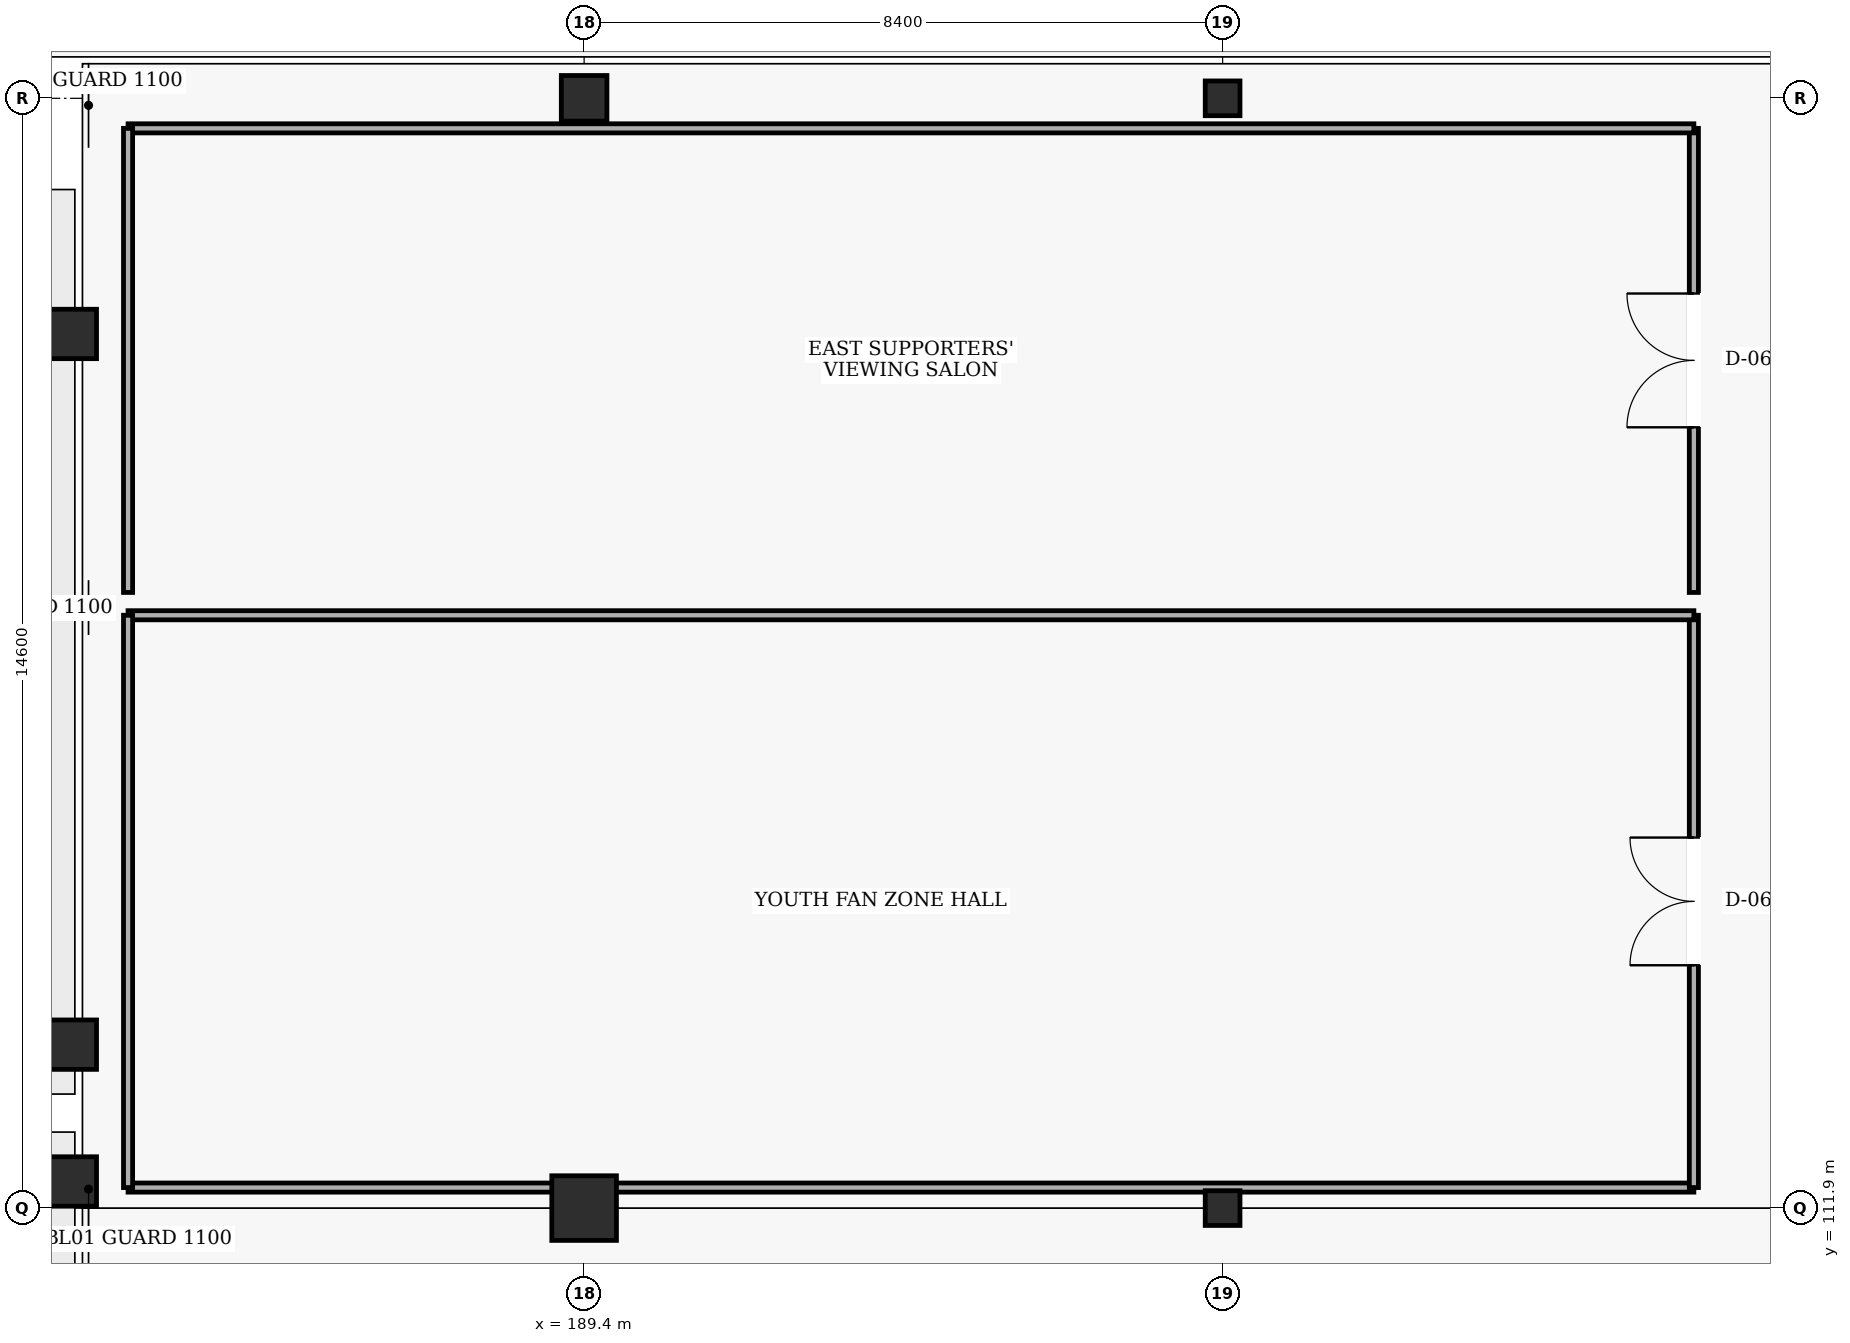
"""IFC4 building model, lengths in metres.
Left out: names, types, materials, properties, quantities, classifications, styles, units other than length and angle.
Written with IfcOpenShell. Run it as: python <this file> out.ifc"""

import sys

from ifc_helpers import new_model, si_unit, direction, frame, frame_2d, origin, origin_2d, place, context, subcontext, project, spatial, rectangle, hollow_circle, extrude, element, fill, save


model = new_model("IFC4")
c1 = context("Model", 3, precision=1e-05, world=origin(), true_north=direction((0.0, 1.0)))
c2 = subcontext(c1, "Body", "Model", "MODEL_VIEW")
j1 = project(units=[si_unit("LENGTHUNIT", "METRE"), si_unit("PLANEANGLEUNIT", "RADIAN")], contexts=[c1])
p1 = place(None, origin())
s1 = spatial("IfcSite", under=j1, at=p1, CompositionType="ELEMENT")
p2 = place(p1, origin())
s2 = spatial("IfcBuilding", under=s1, at=p2, CompositionType="ELEMENT")
p3 = place(p2, frame((0.0, 0.0, 15.0)))
s3 = spatial("IfcBuildingStorey", under=s2, at=p3, CompositionType="ELEMENT", Elevation=15.0)
p4 = place(p3, frame((189.4, 111.9, 0.0), z_axis=(0.0, 0.0, 1.0), x_axis=(1.0, 0.0, 0.0)))
e1 = element("IfcColumn", 1, at=p4, inside=s3, PredefinedType="COLUMN", context=c2, shape_type="SweptSolid", body=[
    extrude(rectangle(XDim=0.85, YDim=0.85, at=origin_2d()), origin(), (0.0, 0.0, 1.0), 4.8),
])
p5 = place(p3, frame((189.4, 126.5, 0.0), z_axis=(0.0, 0.0, 1.0), x_axis=(1.0, 0.0, 0.0)))
e2 = element("IfcColumn", 2, at=p5, inside=s3, PredefinedType="COLUMN", context=c2, shape_type="SweptSolid", body=[
    extrude(rectangle(XDim=0.6, YDim=0.6, at=origin_2d()), origin(), (0.0, 0.0, 1.0), 4.8),
])
for number, where, z_axis, x_axis in (
    (3, (197.8, 111.9, 0.0), (0.0, 0.0, 1.0), (1.0, 0.0, 0.0)),
    (4, (197.8, 126.5, 0.0), (0.0, 0.0, 1.0), (1.0, 0.0, 0.0)),
):
    element("IfcColumn", number, at=place(p3, frame(where, z_axis=z_axis, x_axis=x_axis)), inside=s3, PredefinedType="COLUMN", context=c2, shape_type="SweptSolid", body=[
        extrude(hollow_circle(Radius=0.229, WallThickness=0.02, at=origin_2d()), origin(), (0.0, 0.0, 1.0), 4.8),
    ])
for number, where, z_axis, x_axis in (
    (5, (182.66, 112.25, 0.0), (0.0, 0.0, 1.0), (1.0, 0.0, 0.0)),
    (6, (182.66, 114.05, 0.0), (0.0, 0.0, 1.0), (1.0, 0.0, 0.0)),
    (7, (182.66, 123.4, 0.0), (0.0, 0.0, 1.0), (1.0, 0.0, 0.0)),
):
    element("IfcColumn", number, at=place(p3, frame(where, z_axis=z_axis, x_axis=x_axis)), inside=s3, PredefinedType="COLUMN", context=c2, shape_type="SweptSolid", body=[
        extrude(rectangle(XDim=0.65, YDim=0.65, at=origin_2d()), origin(), (0.0, 0.0, 1.0), 2.188),
    ])
p6 = place(p3, frame((183.4, 112.17, 0.0), z_axis=(0.0, 0.0, 1.0), x_axis=(1.0, 0.0, 0.0)))
e8 = element("IfcWall", 8, at=p6, inside=s3, PredefinedType="PARTITIONING", context=c2, shape_type="SweptSolid", body=[
    extrude(rectangle(XDim=20.6, YDim=0.12, at=frame_2d((10.3, 0.0))), origin(), (0.0, 0.0, 1.0), 3.68),
])
p7 = place(p3, frame((204.0, 112.17, 0.0), z_axis=(0.0, 0.0, 1.0), x_axis=(0.0, 1.0, 0.0)))
e9 = element("IfcWall", 9, at=p7, inside=s3, PredefinedType="PARTITIONING", context=c2, shape_type="SweptSolid", body=[
    extrude(rectangle(XDim=7.529, YDim=0.12, at=frame_2d((3.765, 0.0))), origin(), (0.0, 0.0, 1.0), 4.5),
])
p8 = place(p7, frame((2.925, 0.0, 0.0)))
e10 = element("IfcOpeningElement", 10, at=p8, cuts=e9, PredefinedType="OPENING", context=c2, shape_type="SweptSolid", body=[
    extrude(rectangle(XDim=1.68, YDim=2.25, at=frame_2d((0.84, 1.125))), frame((0.0, 0.07, 0.0), z_axis=(0.0, -1.0, 0.0), x_axis=(1.0, 0.0, 0.0)), (0.0, 0.0, 1.0), 0.14),
])
p9 = place(p3, frame((204.0, 119.699, 0.0), z_axis=(0.0, 0.0, 1.0), x_axis=(-1.0, 0.0, 0.0)))
e11 = element("IfcWall", 11, at=p9, inside=s3, PredefinedType="PARTITIONING", context=c2, shape_type="SweptSolid", body=[
    extrude(rectangle(XDim=20.6, YDim=0.12, at=frame_2d((10.3, 0.0))), origin(), (0.0, 0.0, 1.0), 4.5),
])
p10 = place(p3, frame((183.4, 119.699, 0.0), z_axis=(0.0, 0.0, 1.0), x_axis=(0.0, -1.0, 0.0)))
e12 = element("IfcWall", 12, at=p10, inside=s3, PredefinedType="PARTITIONING", context=c2, shape_type="SweptSolid", body=[
    extrude(rectangle(XDim=7.529, YDim=0.12, at=frame_2d((3.765, 0.0))), origin(), (0.0, 0.0, 1.0), 4.5),
])
p11 = place(p3, frame((204.0, 119.999, 0.0), z_axis=(0.0, 0.0, 1.0), x_axis=(0.0, 1.0, 0.0)))
e13 = element("IfcWall", 13, at=p11, inside=s3, PredefinedType="PARTITIONING", context=c2, shape_type="SweptSolid", body=[
    extrude(rectangle(XDim=6.106, YDim=0.12, at=frame_2d((3.053, 0.0))), origin(), (0.0, 0.0, 1.0), 4.5),
])
p12 = place(p11, frame((2.173, 0.0, 0.0)))
e14 = element("IfcOpeningElement", 14, at=p12, cuts=e13, PredefinedType="OPENING", context=c2, shape_type="SweptSolid", body=[
    extrude(rectangle(XDim=1.76, YDim=2.25, at=frame_2d((0.88, 1.125))), frame((0.0, 0.07, 0.0), z_axis=(0.0, -1.0, 0.0), x_axis=(1.0, 0.0, 0.0)), (0.0, 0.0, 1.0), 0.14),
])
p13 = place(p3, frame((204.0, 126.105, 0.0), z_axis=(0.0, 0.0, 1.0), x_axis=(-1.0, 0.0, 0.0)))
e15 = element("IfcWall", 15, at=p13, inside=s3, PredefinedType="PARTITIONING", context=c2, shape_type="SweptSolid", body=[
    extrude(rectangle(XDim=20.6, YDim=0.12, at=frame_2d((10.3, 0.0))), origin(), (0.0, 0.0, 1.0), 3.68),
])
p14 = place(p3, frame((183.4, 126.105, 0.0), z_axis=(0.0, 0.0, 1.0), x_axis=(0.0, -1.0, 0.0)))
e16 = element("IfcWall", 16, at=p14, inside=s3, PredefinedType="PARTITIONING", context=c2, shape_type="SweptSolid", body=[
    extrude(rectangle(XDim=6.106, YDim=0.12, at=frame_2d((3.053, 0.0))), origin(), (0.0, 0.0, 1.0), 4.5),
])
p15 = place(p8, origin())
e17 = element("IfcDoor", 17, at=p15, inside=s3, OperationType="DOUBLE_DOOR_SINGLE_SWING", PredefinedType="DOOR", context=c2, shape_type="SweptSolid", body=[
    extrude(rectangle(XDim=1.68, YDim=2.25, at=frame_2d((0.84, 1.125))), frame((0.0, 0.025, 0.0), z_axis=(0.0, -1.0, 0.0), x_axis=(1.0, 0.0, 0.0)), (0.0, 0.0, 1.0), 0.05),
])
fill(e10, e17)
p16 = place(p12, origin())
e18 = element("IfcDoor", 18, at=p16, inside=s3, OperationType="DOUBLE_DOOR_SINGLE_SWING", PredefinedType="DOOR", context=c2, shape_type="SweptSolid", body=[
    extrude(rectangle(XDim=1.76, YDim=2.25, at=frame_2d((0.88, 1.125))), frame((0.0, 0.025, 0.0), z_axis=(0.0, -1.0, 0.0), x_axis=(1.0, 0.0, 0.0)), (0.0, 0.0, 1.0), 0.05),
])
fill(e14, e18)
save(model, sys.argv[1])
